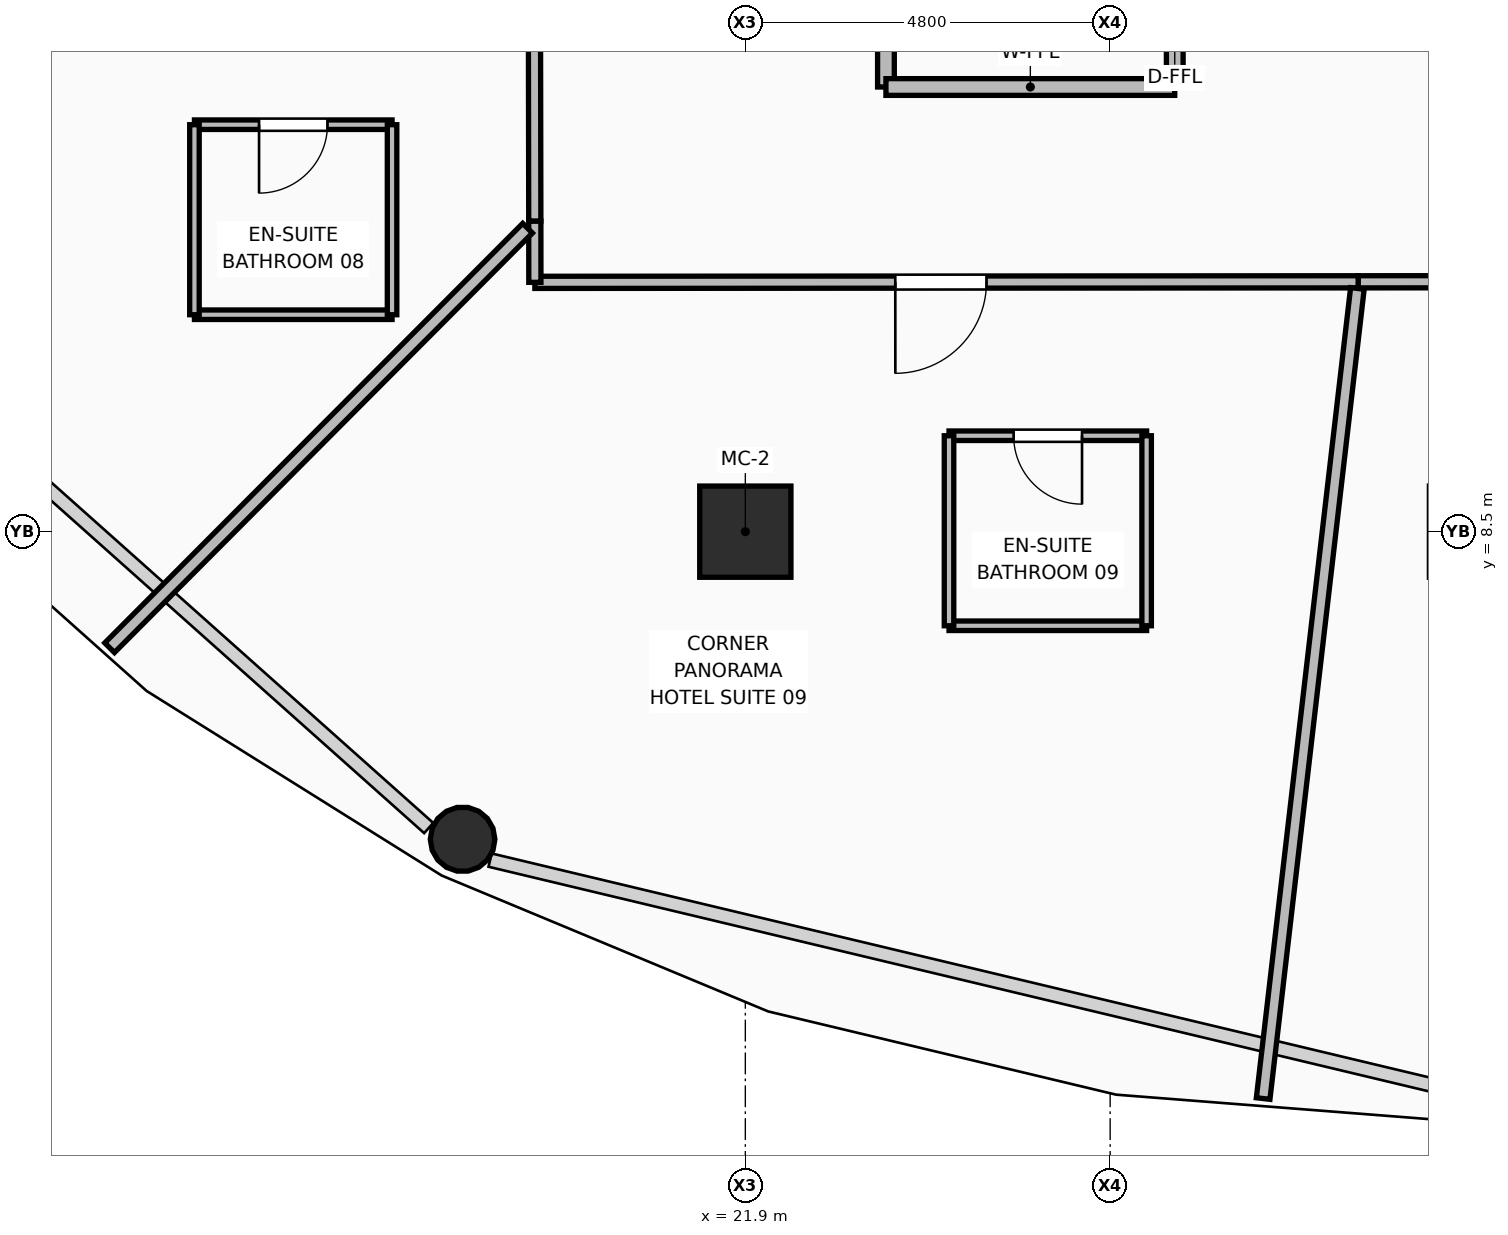
"""IFC4 building model, lengths in metres.
Left out: names, types, materials, properties, quantities, classifications, styles, units other than length and angle.
Written with IfcOpenShell. Run it as: python <this file> out.ifc"""

import sys

from ifc_helpers import new_model, si_unit, direction, frame, frame_2d, origin, origin_2d, place, context, subcontext, project, spatial, rectangle, hollow_rectangle, hollow_circle, extrude, element, fill, save


model = new_model("IFC4")
c1 = context("Model", 3, precision=1e-05, world=origin(), true_north=direction((0.0, 1.0)))
c2 = subcontext(c1, "Body", "Model", "MODEL_VIEW")
j1 = project(units=[si_unit("LENGTHUNIT", "METRE"), si_unit("PLANEANGLEUNIT", "RADIAN")], contexts=[c1])
p1 = place(None, origin())
s1 = spatial("IfcSite", under=j1, at=p1, CompositionType="ELEMENT")
p2 = place(p1, origin())
s2 = spatial("IfcBuilding", under=s1, at=p2, CompositionType="ELEMENT")
p3 = place(p2, frame((0.0, 0.0, 49.5)))
s3 = spatial("IfcBuildingStorey", under=s2, at=p3, CompositionType="ELEMENT", Elevation=49.5)
p4 = place(p3, frame((21.9, 8.5, 0.0), z_axis=(0.0, 0.0, 1.0), x_axis=(1.0, 0.0, 0.0)))
e1 = element("IfcColumn", 1, at=p4, inside=s3, PredefinedType="COLUMN", context=c2, shape_type="SweptSolid", body=[
    extrude(hollow_rectangle(XDim=1.2, YDim=1.2, WallThickness=0.045, at=origin_2d()), origin(), (0.0, 0.0, 1.0), 3.75),
])
p5 = place(p3, frame((18.18, 4.453, 0.0), z_axis=(0.0, 0.0, 1.0), x_axis=(1.0, 0.0, 0.0)))
e2 = element("IfcColumn", 2, at=p5, inside=s3, PredefinedType="COLUMN", context=c2, shape_type="SweptSolid", body=[
    extrude(hollow_circle(Radius=0.425, WallThickness=0.04, at=origin_2d()), origin(), (0.0, 0.0, 1.0), 3.57),
])
p6 = place(p3, frame((23.75, 14.35, 0.0), z_axis=(0.0, 0.0, 1.0), x_axis=(0.0, 1.0, 0.0)))
e3 = element("IfcWall", 3, at=p6, inside=s3, PredefinedType="PARTITIONING", context=c2, shape_type="SweptSolid", body=[
    extrude(rectangle(XDim=3.45, YDim=0.22, at=frame_2d((1.725, 0.0))), origin(), (0.0, 0.0, 1.0), 2.928),
])
p7 = place(p3, frame((23.75, 14.35, 0.0), z_axis=(0.0, 0.0, 1.0), x_axis=(1.0, 0.0, 0.0)))
e4 = element("IfcWall", 4, at=p7, inside=s3, PredefinedType="PARTITIONING", context=c2, shape_type="SweptSolid", body=[
    extrude(rectangle(XDim=3.8, YDim=0.22, at=frame_2d((1.9, 0.0))), origin(), (0.0, 0.0, 1.0), 3.55),
])
p8 = place(p3, frame((27.55, 14.35, 0.0), z_axis=(0.0, 0.0, 1.0), x_axis=(0.0, 1.0, 0.0)))
e5 = element("IfcWall", 5, at=p8, inside=s3, PredefinedType="PARTITIONING", context=c2, shape_type="SweptSolid", body=[
    extrude(rectangle(XDim=3.45, YDim=0.22, at=frame_2d((1.725, 0.0))), origin(), (0.0, 0.0, 1.0), 2.928),
])
p9 = place(p8, frame((1.175, 0.0, 0.0)))
e6 = element("IfcOpeningElement", 6, at=p9, cuts=e5, PredefinedType="OPENING", context=c2, shape_type="SweptSolid", body=[
    extrude(rectangle(XDim=1.1, YDim=2.1, at=frame_2d((0.55, 1.05))), frame((0.0, 0.12, 0.0), z_axis=(0.0, -1.0, 0.0), x_axis=(1.0, 0.0, 0.0)), (0.0, 0.0, 1.0), 0.24),
])
p10 = place(p3, frame((34.608, 11.79, 0.0), z_axis=(0.0, 0.0, 1.0), x_axis=(-0.999999801099, -0.000630715737, 0.0)))
e7 = element("IfcWall", 7, at=p10, inside=s3, PredefinedType="PARTITIONING", context=c2, shape_type="SweptSolid", body=[
    extrude(rectangle(XDim=4.645, YDim=0.16, at=frame_2d((2.323, 0.0))), origin(), (0.0, 0.0, 1.0), 2.928),
])
p11 = place(p10, frame((1.797, 0.0, 0.0)))
e8 = element("IfcOpeningElement", 8, at=p11, cuts=e7, PredefinedType="OPENING", context=c2, shape_type="SweptSolid", body=[
    extrude(rectangle(XDim=1.2, YDim=2.1, at=frame_2d((0.6, 1.05))), frame((0.0, 0.09, 0.0), z_axis=(0.0, -1.0, 0.0), x_axis=(1.0, 0.0, 0.0)), (0.0, 0.0, 1.0), 0.18),
])
p12 = place(p3, frame((29.963, 11.787, 0.0), z_axis=(0.0, 0.0, 1.0), x_axis=(-0.999999786378, -0.000653638826, 0.0)))
e9 = element("IfcWall", 9, at=p12, inside=s3, PredefinedType="PARTITIONING", context=c2, shape_type="SweptSolid", body=[
    extrude(rectangle(XDim=10.832, YDim=0.16, at=frame_2d((5.416, 0.0))), origin(), (0.0, 0.0, 1.0), 2.928),
])
p13 = place(p12, frame((4.89, 0.0, 0.0)))
e10 = element("IfcOpeningElement", 10, at=p13, cuts=e9, PredefinedType="OPENING", context=c2, shape_type="SweptSolid", body=[
    extrude(rectangle(XDim=1.2, YDim=2.1, at=frame_2d((0.6, 1.05))), frame((0.0, 0.09, 0.0), z_axis=(0.0, -1.0, 0.0), x_axis=(1.0, 0.0, 0.0)), (0.0, 0.0, 1.0), 0.18),
])
p14 = place(p3, frame((19.131, 11.78, 0.0), z_axis=(0.0, 0.0, 1.0), x_axis=(-0.001512857573, 0.99999885563, 0.0)))
e11 = element("IfcWall", 11, at=p14, inside=s3, PredefinedType="PARTITIONING", context=c2, shape_type="SweptSolid", body=[
    extrude(rectangle(XDim=0.807, YDim=0.16, at=frame_2d((0.403, 0.0))), origin(), (0.0, 0.0, 1.0), 3.55),
])
p15 = place(p3, frame((19.13, 12.587, 0.0), z_axis=(0.0, 0.0, 1.0), x_axis=(-0.001678829751, 0.999998590764, 0.0)))
e12 = element("IfcWall", 12, at=p15, inside=s3, PredefinedType="PARTITIONING", context=c2, shape_type="SweptSolid", body=[
    extrude(rectangle(XDim=10.034, YDim=0.16, at=frame_2d((5.017, 0.0))), origin(), (0.0, 0.0, 1.0), 2.928),
])
p16 = place(p15, frame((7.33, 0.0, 0.0)))
e13 = element("IfcOpeningElement", 13, at=p16, cuts=e12, PredefinedType="OPENING", context=c2, shape_type="SweptSolid", body=[
    extrude(rectangle(XDim=1.2, YDim=2.1, at=frame_2d((0.6, 1.05))), frame((0.0, 0.09, 0.0), z_axis=(0.0, -1.0, 0.0), x_axis=(1.0, 0.0, 0.0)), (0.0, 0.0, 1.0), 0.18),
])
p17 = place(p3, frame((19.035, 12.492, 0.0), z_axis=(0.0, 0.0, 1.0), x_axis=(-0.705820822029, -0.708390405913, 0.0)))
e14 = element("IfcWall", 14, at=p17, inside=s3, PredefinedType="PARTITIONING", context=c2, shape_type="SweptSolid", body=[
    extrude(rectangle(XDim=7.791, YDim=0.18, at=frame_2d((3.896, 0.0))), origin(), (0.0, 0.0, 1.0), 2.775),
])
p18 = place(p3, frame((29.953, 11.7, 0.0), z_axis=(0.0, 0.0, 1.0), x_axis=(-0.115564552906, -0.993299971867, 0.0)))
e15 = element("IfcWall", 15, at=p18, inside=s3, PredefinedType="PARTITIONING", context=c2, shape_type="SweptSolid", body=[
    extrude(rectangle(XDim=10.73, YDim=0.18, at=frame_2d((5.365, 0.0))), origin(), (0.0, 0.0, 1.0), 2.775),
])
p19 = place(p3, frame((14.652, 11.354, 0.0), z_axis=(0.0, 0.0, 1.0), x_axis=(1.0, 0.0, 0.0)))
e16 = element("IfcWall", 16, at=p19, inside=s3, PredefinedType="PARTITIONING", context=c2, shape_type="SweptSolid", body=[
    extrude(rectangle(XDim=2.6, YDim=0.125, at=frame_2d((1.3, 0.0))), origin(), (0.0, 0.0, 1.0), 3.55),
])
p20 = place(p3, frame((14.652, 13.854, 0.0), z_axis=(0.0, 0.0, 1.0), x_axis=(1.0, 0.0, 0.0)))
e17 = element("IfcWall", 17, at=p20, inside=s3, PredefinedType="PARTITIONING", context=c2, shape_type="SweptSolid", body=[
    extrude(rectangle(XDim=2.6, YDim=0.125, at=frame_2d((1.3, 0.0))), origin(), (0.0, 0.0, 1.0), 3.55),
])
p21 = place(p20, frame((0.85, 0.0, 0.0)))
e18 = element("IfcOpeningElement", 18, at=p21, cuts=e17, PredefinedType="OPENING", context=c2, shape_type="SweptSolid", body=[
    extrude(rectangle(XDim=0.9, YDim=2.1, at=frame_2d((0.45, 1.05))), frame((0.0, 0.073, 0.0), z_axis=(0.0, -1.0, 0.0), x_axis=(1.0, 0.0, 0.0)), (0.0, 0.0, 1.0), 0.145),
])
for number, where, z_axis, x_axis in (
    (19, (14.652, 11.354, 0.0), (0.0, 0.0, 1.0), (0.0, 1.0, 0.0)),
    (20, (17.252, 11.354, 0.0), (0.0, 0.0, 1.0), (0.0, 1.0, 0.0)),
):
    element("IfcWall", number, at=place(p3, frame(where, z_axis=z_axis, x_axis=x_axis)), inside=s3, PredefinedType="PARTITIONING", context=c2, shape_type="SweptSolid", body=[
        extrude(rectangle(XDim=2.5, YDim=0.125, at=frame_2d((1.25, 0.0))), origin(), (0.0, 0.0, 1.0), 3.55),
    ])
p22 = place(p3, frame((24.58, 7.262, 0.0), z_axis=(0.0, 0.0, 1.0), x_axis=(1.0, 0.0, 0.0)))
e21 = element("IfcWall", 21, at=p22, inside=s3, PredefinedType="PARTITIONING", context=c2, shape_type="SweptSolid", body=[
    extrude(rectangle(XDim=2.6, YDim=0.125, at=frame_2d((1.3, 0.0))), origin(), (0.0, 0.0, 1.0), 3.55),
])
p23 = place(p3, frame((24.58, 9.762, 0.0), z_axis=(0.0, 0.0, 1.0), x_axis=(1.0, 0.0, 0.0)))
e22 = element("IfcWall", 22, at=p23, inside=s3, PredefinedType="PARTITIONING", context=c2, shape_type="SweptSolid", body=[
    extrude(rectangle(XDim=2.6, YDim=0.125, at=frame_2d((1.3, 0.0))), origin(), (0.0, 0.0, 1.0), 3.55),
])
p24 = place(p23, frame((0.85, 0.0, 0.0)))
e23 = element("IfcOpeningElement", 23, at=p24, cuts=e22, PredefinedType="OPENING", context=c2, shape_type="SweptSolid", body=[
    extrude(rectangle(XDim=0.9, YDim=2.1, at=frame_2d((0.45, 1.05))), frame((0.0, 0.073, 0.0), z_axis=(0.0, -1.0, 0.0), x_axis=(1.0, 0.0, 0.0)), (0.0, 0.0, 1.0), 0.145),
])
for number, where, z_axis, x_axis in (
    (24, (24.58, 7.262, 0.0), (0.0, 0.0, 1.0), (0.0, 1.0, 0.0)),
    (25, (27.18, 7.262, 0.0), (0.0, 0.0, 1.0), (0.0, 1.0, 0.0)),
):
    element("IfcWall", number, at=place(p3, frame(where, z_axis=z_axis, x_axis=x_axis)), inside=s3, PredefinedType="PARTITIONING", context=c2, shape_type="SweptSolid", body=[
        extrude(rectangle(XDim=2.5, YDim=0.125, at=frame_2d((1.25, 0.0))), origin(), (0.0, 0.0, 1.0), 3.55),
    ])
p25 = place(p21, frame((0.9, 0.0, 0.0), z_axis=(0.0, 0.0, 1.0), x_axis=(-1.0, 0.0, 0.0)))
e26 = element("IfcDoor", 26, at=p25, inside=s3, OperationType="SINGLE_SWING_RIGHT", PredefinedType="DOOR", context=c2, shape_type="SweptSolid", body=[
    extrude(rectangle(XDim=0.9, YDim=2.1, at=frame_2d((0.45, 1.05))), frame((0.0, 0.025, 0.0), z_axis=(0.0, -1.0, 0.0), x_axis=(1.0, 0.0, 0.0)), (0.0, 0.0, 1.0), 0.05),
])
fill(e18, e26)
p26 = place(p24, frame((0.9, 0.0, 0.0), z_axis=(0.0, 0.0, 1.0), x_axis=(-1.0, 0.0, 0.0)))
e27 = element("IfcDoor", 27, at=p26, inside=s3, OperationType="SINGLE_SWING_LEFT", PredefinedType="DOOR", context=c2, shape_type="SweptSolid", body=[
    extrude(rectangle(XDim=0.9, YDim=2.1, at=frame_2d((0.45, 1.05))), frame((0.0, 0.025, 0.0), z_axis=(0.0, -1.0, 0.0), x_axis=(1.0, 0.0, 0.0)), (0.0, 0.0, 1.0), 0.05),
])
fill(e23, e27)
p27 = place(p13, origin())
e28 = element("IfcDoor", 28, at=p27, inside=s3, OperationType="SINGLE_SWING_RIGHT", PredefinedType="DOOR", context=c2, shape_type="SweptSolid", body=[
    extrude(rectangle(XDim=1.2, YDim=2.1, at=frame_2d((0.6, 1.05))), frame((0.0, 0.025, 0.0), z_axis=(0.0, -1.0, 0.0), x_axis=(1.0, 0.0, 0.0)), (0.0, 0.0, 1.0), 0.05),
])
fill(e10, e28)
save(model, sys.argv[1])
